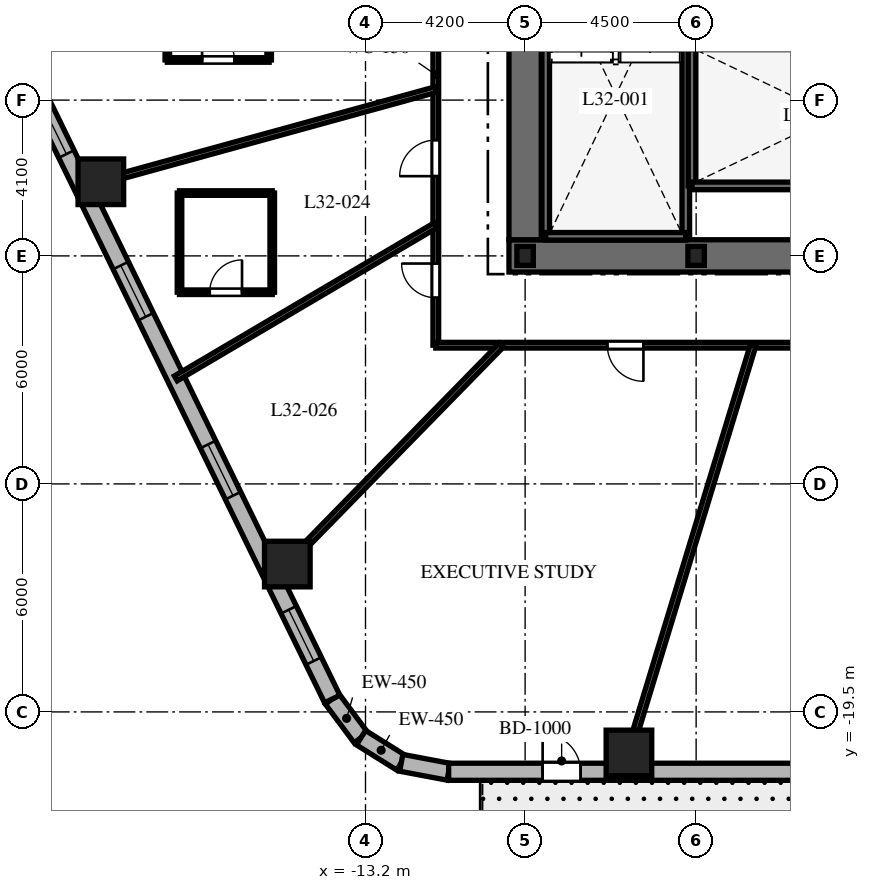
"""IFC4 building model, lengths in metres.
Left out: names, types, materials, properties, quantities, classifications, styles, units other than length and angle.
Written with IfcOpenShell. Run it as: python <this file> out.ifc"""

import sys

from ifc_helpers import new_model, si_unit, direction, frame, frame_2d, origin, origin_2d, place, context, subcontext, project, spatial, rectangle, i_section, extrude, element, fill, save


model = new_model("IFC4")
c1 = context("Model", 3, precision=1e-05, world=origin(), true_north=direction((0.0, 1.0)))
c2 = subcontext(c1, "Body", "Model", "MODEL_VIEW")
j1 = project(units=[si_unit("LENGTHUNIT", "METRE"), si_unit("PLANEANGLEUNIT", "RADIAN")], contexts=[c1])
p1 = place(None, origin())
s1 = spatial("IfcSite", under=j1, at=p1, CompositionType="ELEMENT")
p2 = place(p1, origin())
s2 = spatial("IfcBuilding", under=s1, at=p2, CompositionType="ELEMENT")
p3 = place(p2, frame((0.0, 0.0, 132.1)))
s3 = spatial("IfcBuildingStorey", under=s2, at=p3, CompositionType="ELEMENT", Elevation=132.1)
p4 = place(p3, frame((-9.425, -7.5, 0.0), z_axis=(0.0, 0.0, 1.0), x_axis=(1.0, 0.0, 0.0)))
e1 = element("IfcWall", 1, at=p4, inside=s3, PredefinedType="SHEAR", context=c2, shape_type="SweptSolid", body=[
    extrude(rectangle(XDim=18.85, YDim=0.85, at=frame_2d((9.425, 0.0))), origin(), (0.0, 0.0, 1.0), 3.7),
])
p5 = place(p4, frame((9.475, 0.0, 0.0)))
e2 = element("IfcOpeningElement", 2, at=p5, cuts=e1, PredefinedType="OPENING", context=c2, shape_type="SweptSolid", body=[
    extrude(rectangle(XDim=1.0, YDim=2.15, at=frame_2d((0.5, 1.075))), frame((0.0, 0.435, 0.0), z_axis=(0.0, -1.0, 0.0), x_axis=(1.0, 0.0, 0.0)), (0.0, 0.0, 1.0), 0.87),
])
p6 = place(p3, frame((-9.0, -7.075, 0.0), z_axis=(0.0, 0.0, 1.0), x_axis=(0.0, 1.0, 0.0)))
e3 = element("IfcWall", 3, at=p6, inside=s3, PredefinedType="SHEAR", context=c2, shape_type="SweptSolid", body=[
    extrude(rectangle(XDim=14.15, YDim=0.85, at=frame_2d((7.075, 0.0))), origin(), (0.0, 0.0, 1.0), 3.7),
])
p7 = place(p6, frame((10.2, 0.0, 0.0)))
e4 = element("IfcOpeningElement", 4, at=p7, cuts=e3, PredefinedType="OPENING", context=c2, shape_type="SweptSolid", body=[
    extrude(rectangle(XDim=1.05, YDim=2.15, at=frame_2d((0.525, 1.075))), frame((0.0, 0.435, 0.0), z_axis=(0.0, -1.0, 0.0), x_axis=(1.0, 0.0, 0.0)), (0.0, 0.0, 1.0), 0.87),
])
for number, where, z_axis, x_axis in (
    (5, (-8.458, -6.985, 0.0), (0.0, 0.0, 1.0), (0.0, 1.0, 0.0)),
    (6, (-4.772, -6.985, 0.0), (0.0, 0.0, 1.0), (0.0, 1.0, 0.0)),
):
    element("IfcWall", number, at=place(p3, frame(where, z_axis=z_axis, x_axis=x_axis)), inside=s3, PredefinedType="SHEAR", context=c2, shape_type="SweptSolid", body=[
        extrude(rectangle(XDim=9.143, YDim=0.2, at=frame_2d((4.572, 0.0))), origin(), (0.0, 0.0, 1.0), 3.7),
    ])
for number, where, z_axis, x_axis in (
    (7, (-8.458, -6.985, 0.0), (0.0, 0.0, 1.0), (1.0, 0.0, 0.0)),
    (8, (-4.608, -5.658, 0.0), (0.0, 0.0, 1.0), (0.0, 1.0, 0.0)),
):
    element("IfcWall", number, at=place(p3, frame(where, z_axis=z_axis, x_axis=x_axis)), inside=s3, PredefinedType="SHEAR", context=c2, shape_type="SweptSolid", body=[
        extrude(rectangle(XDim=3.686, YDim=0.2, at=frame_2d((1.843, 0.0))), origin(), (0.0, 0.0, 1.0), 3.7),
    ])
p8 = place(p3, frame((-4.608, -5.658, 0.0), z_axis=(0.0, 0.0, 1.0), x_axis=(1.0, 0.0, 0.0)))
e9 = element("IfcWall", 9, at=p8, inside=s3, PredefinedType="SHEAR", context=c2, shape_type="SweptSolid", body=[
    extrude(rectangle(XDim=9.166, YDim=0.2, at=frame_2d((4.583, 0.0))), origin(), (0.0, 0.0, 1.0), 3.7),
])
p9 = place(p8, frame((7.45, 0.0, 0.0)))
e10 = element("IfcOpeningElement", 10, at=p9, cuts=e9, PredefinedType="OPENING", context=c2, shape_type="SweptSolid", body=[
    extrude(rectangle(XDim=1.0, YDim=2.15, at=frame_2d((0.5, 1.075))), frame((0.0, 0.11, 0.0), z_axis=(0.0, -1.0, 0.0), x_axis=(1.0, 0.0, 0.0)), (0.0, 0.0, 1.0), 0.22),
])
for number, where, z_axis, x_axis in (
    (11, (-9.0, -7.5, 0.0), (0.0, 0.0, 1.0), (1.0, 0.0, 0.0)),
    (12, (-4.5, -7.5, 0.0), (0.0, 0.0, 1.0), (1.0, 0.0, 0.0)),
):
    element("IfcColumn", number, at=place(p3, frame(where, z_axis=z_axis, x_axis=x_axis)), inside=s3, PredefinedType="COLUMN", context=c2, shape_type="SweptSolid", body=[
        extrude(i_section(OverallWidth=0.432, OverallDepth=0.498, WebThickness=0.056, FlangeThickness=0.089, at=origin_2d()), origin(), (0.0, 0.0, 1.0), 3.7),
    ])
for number, where, z_axis, x_axis in (
    (13, (-6.268, -20.58, 0.0), (0.0, 0.0, 1.0), (1.0, 0.0, 0.0)),
    (14, (-20.164, -5.549, 0.0), (0.0, 0.0, 1.0), (1.0, 0.0, 0.0)),
    (15, (-15.257, -15.609, 0.0), (0.0, 0.0, 1.0), (1.0, 0.0, 0.0)),
):
    element("IfcColumn", number, at=place(p3, frame(where, z_axis=z_axis, x_axis=x_axis)), inside=s3, PredefinedType="COLUMN", context=c2, shape_type="SweptSolid", body=[
        extrude(rectangle(XDim=1.2, YDim=1.2, at=origin_2d()), origin(), (0.0, 0.0, 1.0), 3.7),
    ])
p10 = place(p3, frame((-14.076, -19.161, 0.0), z_axis=(0.0, 0.0, 1.0), x_axis=(0.597226657159, -0.802072515412, 0.0)))
e16 = element("IfcWall", 16, at=p10, inside=s3, PredefinedType="SOLIDWALL", context=c2, shape_type="SweptSolid", body=[
    extrude(rectangle(XDim=1.269, YDim=0.45, at=frame_2d((0.635, 0.0))), origin(), (0.0, 0.0, 1.0), 3.4),
])
p11 = place(p3, frame((-13.318, -20.179, 0.0), z_axis=(0.0, 0.0, 1.0), x_axis=(0.848031272749, -0.529946186362, 0.0)))
e17 = element("IfcWall", 17, at=p11, inside=s3, PredefinedType="SOLIDWALL", context=c2, shape_type="SweptSolid", body=[
    extrude(rectangle(XDim=1.248, YDim=0.45, at=frame_2d((0.624, 0.0))), origin(), (0.0, 0.0, 1.0), 3.4),
])
p12 = place(p3, frame((-12.259, -20.84, 0.0), z_axis=(0.0, 0.0, 1.0), x_axis=(0.982730354425, -0.185043374624, 0.0)))
e18 = element("IfcWall", 18, at=p12, inside=s3, PredefinedType="SOLIDWALL", context=c2, shape_type="SweptSolid", body=[
    extrude(rectangle(XDim=1.269, YDim=0.45, at=frame_2d((0.635, 0.0))), origin(), (0.0, 0.0, 1.0), 3.4),
])
p13 = place(p3, frame((-11.012, -21.075, 0.0), z_axis=(0.0, 0.0, 1.0), x_axis=(1.0, 0.0, 0.0)))
e19 = element("IfcWall", 19, at=p13, inside=s3, PredefinedType="SOLIDWALL", context=c2, shape_type="SweptSolid", body=[
    extrude(rectangle(XDim=23.782, YDim=0.45, at=frame_2d((11.891, 0.0))), origin(), (0.0, 0.0, 1.0), 3.4),
])
p14 = place(p13, frame((2.473, 0.0, 0.0)))
e20 = element("IfcOpeningElement", 20, at=p14, cuts=e19, PredefinedType="OPENING", context=c2, shape_type="SweptSolid", body=[
    extrude(rectangle(XDim=1.0, YDim=2.15, at=frame_2d((0.5, 1.075))), frame((0.0, 0.235, 0.0), z_axis=(0.0, -1.0, 0.0), x_axis=(1.0, 0.0, 0.0)), (0.0, 0.0, 1.0), 0.47),
])
p15 = place(p13, frame((11.142, 0.0, 0.8)))
e21 = element("IfcOpeningElement", 21, at=p15, cuts=e19, PredefinedType="OPENING", context=c2, shape_type="SweptSolid", body=[
    extrude(rectangle(XDim=1.5, YDim=1.8, at=frame_2d((0.75, 0.9))), frame((0.0, 0.235, 0.0), z_axis=(0.0, -1.0, 0.0), x_axis=(1.0, 0.0, 0.0)), (0.0, 0.0, 1.0), 0.47),
])
p16 = place(p13, frame((20.741, 0.0, 0.8)))
e22 = element("IfcOpeningElement", 22, at=p16, cuts=e19, PredefinedType="OPENING", context=c2, shape_type="SweptSolid", body=[
    extrude(rectangle(XDim=1.5, YDim=1.8, at=frame_2d((0.75, 0.9))), frame((0.0, 0.235, 0.0), z_axis=(0.0, -1.0, 0.0), x_axis=(1.0, 0.0, 0.0)), (0.0, 0.0, 1.0), 0.47),
])
p17 = place(p3, frame((-22.238, -2.427, 0.0), z_axis=(0.0, 0.0, 1.0), x_axis=(0.438374803278, -0.898792262901, 0.0)))
e23 = element("IfcWall", 23, at=p17, inside=s3, PredefinedType="SOLIDWALL", context=c2, shape_type="SweptSolid", body=[
    extrude(rectangle(XDim=18.618, YDim=0.45, at=frame_2d((9.309, 0.0))), origin(), (0.0, 0.0, 1.0), 3.4),
])
p18 = place(p17, frame((1.163, 0.0, 0.8)))
e24 = element("IfcOpeningElement", 24, at=p18, cuts=e23, PredefinedType="OPENING", context=c2, shape_type="SweptSolid", body=[
    extrude(rectangle(XDim=1.5, YDim=1.8, at=frame_2d((0.75, 0.9))), frame((0.0, 0.235, 0.0), z_axis=(0.0, -1.0, 0.0), x_axis=(1.0, 0.0, 0.0)), (0.0, 0.0, 1.0), 0.47),
])
p19 = place(p17, frame((5.926, 0.0, 0.8)))
e25 = element("IfcOpeningElement", 25, at=p19, cuts=e23, PredefinedType="OPENING", context=c2, shape_type="SweptSolid", body=[
    extrude(rectangle(XDim=1.5, YDim=1.8, at=frame_2d((0.75, 0.9))), frame((0.0, 0.235, 0.0), z_axis=(0.0, -1.0, 0.0), x_axis=(1.0, 0.0, 0.0)), (0.0, 0.0, 1.0), 0.47),
])
p20 = place(p17, frame((11.165, 0.0, 0.8)))
e26 = element("IfcOpeningElement", 26, at=p20, cuts=e23, PredefinedType="OPENING", context=c2, shape_type="SweptSolid", body=[
    extrude(rectangle(XDim=1.5, YDim=1.8, at=frame_2d((0.75, 0.9))), frame((0.0, 0.235, 0.0), z_axis=(0.0, -1.0, 0.0), x_axis=(1.0, 0.0, 0.0)), (0.0, 0.0, 1.0), 0.47),
])
p21 = place(p17, frame((16.006, 0.0, 0.8)))
e27 = element("IfcOpeningElement", 27, at=p21, cuts=e23, PredefinedType="OPENING", context=c2, shape_type="SweptSolid", body=[
    extrude(rectangle(XDim=1.5, YDim=1.8, at=frame_2d((0.75, 0.9))), frame((0.0, 0.235, 0.0), z_axis=(0.0, -1.0, 0.0), x_axis=(1.0, 0.0, 0.0)), (0.0, 0.0, 1.0), 0.47),
])
p22 = place(p3, frame((-11.35, -9.85, 0.0), z_axis=(0.0, 0.0, 1.0), x_axis=(0.0, 1.0, 0.0)))
e28 = element("IfcWall", 28, at=p22, inside=s3, PredefinedType="PARTITIONING", context=c2, shape_type="SweptSolid", body=[
    extrude(rectangle(XDim=19.7, YDim=0.15, at=frame_2d((9.85, 0.0))), origin(), (0.0, 0.0, 1.0), 2.84),
])
p23 = place(p22, frame((16.711, 0.0, 0.0)))
e29 = element("IfcOpeningElement", 29, at=p23, cuts=e28, PredefinedType="OPENING", context=c2, shape_type="SweptSolid", body=[
    extrude(rectangle(XDim=0.95, YDim=2.03, at=frame_2d((0.475, 1.015))), frame((0.0, 0.085, 0.0), z_axis=(0.0, -1.0, 0.0), x_axis=(1.0, 0.0, 0.0)), (0.0, 0.0, 1.0), 0.17),
])
p24 = place(p22, frame((12.968, 0.0, 0.0)))
e30 = element("IfcOpeningElement", 30, at=p24, cuts=e28, PredefinedType="OPENING", context=c2, shape_type="SweptSolid", body=[
    extrude(rectangle(XDim=0.9, YDim=2.03, at=frame_2d((0.45, 1.015))), frame((0.0, 0.085, 0.0), z_axis=(0.0, -1.0, 0.0), x_axis=(1.0, 0.0, 0.0)), (0.0, 0.0, 1.0), 0.17),
])
p25 = place(p22, frame((8.836, 0.0, 0.0)))
e31 = element("IfcOpeningElement", 31, at=p25, cuts=e28, PredefinedType="OPENING", context=c2, shape_type="SweptSolid", body=[
    extrude(rectangle(XDim=0.95, YDim=2.03, at=frame_2d((0.475, 1.015))), frame((0.0, 0.085, 0.0), z_axis=(0.0, -1.0, 0.0), x_axis=(1.0, 0.0, 0.0)), (0.0, 0.0, 1.0), 0.17),
])
p26 = place(p22, frame((4.448, 0.0, 0.0)))
e32 = element("IfcOpeningElement", 32, at=p26, cuts=e28, PredefinedType="OPENING", context=c2, shape_type="SweptSolid", body=[
    extrude(rectangle(XDim=0.95, YDim=2.03, at=frame_2d((0.475, 1.015))), frame((0.0, 0.085, 0.0), z_axis=(0.0, -1.0, 0.0), x_axis=(1.0, 0.0, 0.0)), (0.0, 0.0, 1.0), 0.17),
])
p27 = place(p22, frame((1.249, 0.0, 0.0)))
e33 = element("IfcOpeningElement", 33, at=p27, cuts=e28, PredefinedType="OPENING", context=c2, shape_type="SweptSolid", body=[
    extrude(rectangle(XDim=0.9, YDim=2.03, at=frame_2d((0.45, 1.015))), frame((0.0, 0.085, 0.0), z_axis=(0.0, -1.0, 0.0), x_axis=(1.0, 0.0, 0.0)), (0.0, 0.0, 1.0), 0.17),
])
p28 = place(p3, frame((11.35, -9.85, 0.0), z_axis=(0.0, 0.0, 1.0), x_axis=(-1.0, 0.0, 0.0)))
e34 = element("IfcWall", 34, at=p28, inside=s3, PredefinedType="PARTITIONING", context=c2, shape_type="SweptSolid", body=[
    extrude(rectangle(XDim=22.7, YDim=0.15, at=frame_2d((11.35, 0.0))), origin(), (0.0, 0.0, 1.0), 2.84),
])
p29 = place(p28, frame((17.237, 0.0, 0.0)))
e35 = element("IfcOpeningElement", 35, at=p29, cuts=e34, PredefinedType="OPENING", context=c2, shape_type="SweptSolid", body=[
    extrude(rectangle(XDim=0.95, YDim=2.03, at=frame_2d((0.475, 1.015))), frame((0.0, 0.085, 0.0), z_axis=(0.0, -1.0, 0.0), x_axis=(1.0, 0.0, 0.0)), (0.0, 0.0, 1.0), 0.17),
])
p30 = place(p28, frame((10.45, 0.0, 0.0)))
e36 = element("IfcOpeningElement", 36, at=p30, cuts=e34, PredefinedType="OPENING", context=c2, shape_type="SweptSolid", body=[
    extrude(rectangle(XDim=0.95, YDim=2.03, at=frame_2d((0.475, 1.015))), frame((0.0, 0.085, 0.0), z_axis=(0.0, -1.0, 0.0), x_axis=(1.0, 0.0, 0.0)), (0.0, 0.0, 1.0), 0.17),
])
p31 = place(p28, frame((3.399, 0.0, 0.0)))
e37 = element("IfcOpeningElement", 37, at=p31, cuts=e34, PredefinedType="OPENING", context=c2, shape_type="SweptSolid", body=[
    extrude(rectangle(XDim=0.95, YDim=2.03, at=frame_2d((0.475, 1.015))), frame((0.0, 0.085, 0.0), z_axis=(0.0, -1.0, 0.0), x_axis=(1.0, 0.0, 0.0)), (0.0, 0.0, 1.0), 0.17),
])
p32 = place(p3, frame((-11.35, -3.123, 0.0), z_axis=(0.0, 0.0, 1.0), x_axis=(-0.964151983214, -0.265350623261, 0.0)))
e38 = element("IfcWall", 38, at=p32, inside=s3, PredefinedType="PARTITIONING", context=c2, shape_type="SweptSolid", body=[
    extrude(rectangle(XDim=9.645, YDim=0.15, at=frame_2d((4.823, 0.0))), origin(), (0.0, 0.0, 1.0), 2.54),
])
p33 = place(p3, frame((-11.35, -6.691, 0.0), z_axis=(0.0, 0.0, 1.0), x_axis=(-0.861446954497, -0.507847560383, 0.0)))
e39 = element("IfcWall", 39, at=p33, inside=s3, PredefinedType="PARTITIONING", context=c2, shape_type="SweptSolid", body=[
    extrude(rectangle(XDim=7.941, YDim=0.15, at=frame_2d((3.97, 0.0))), origin(), (0.0, 0.0, 1.0), 2.54),
])
p34 = place(p3, frame((-9.628, -9.85, 0.0), z_axis=(0.0, 0.0, 1.0), x_axis=(-0.698992824326, -0.715128681805, 0.0)))
e40 = element("IfcWall", 40, at=p34, inside=s3, PredefinedType="PARTITIONING", context=c2, shape_type="SweptSolid", body=[
    extrude(rectangle(XDim=8.579, YDim=0.15, at=frame_2d((4.29, 0.0))), origin(), (0.0, 0.0, 1.0), 2.54),
])
p35 = place(p3, frame((-3.0, -9.85, 0.0), z_axis=(0.0, 0.0, 1.0), x_axis=(-0.291352035382, -0.95661590593, 0.0)))
e41 = element("IfcWall", 41, at=p35, inside=s3, PredefinedType="PARTITIONING", context=c2, shape_type="SweptSolid", body=[
    extrude(rectangle(XDim=11.734, YDim=0.15, at=frame_2d((5.867, 0.0))), origin(), (0.0, 0.0, 1.0), 2.54),
])
p36 = place(p3, frame((-18.415, -2.344, 0.0), z_axis=(0.0, 0.0, 1.0), x_axis=(1.0, 0.0, 0.0)))
e42 = element("IfcWall", 42, at=p36, inside=s3, PredefinedType="PARTITIONING", context=c2, shape_type="SweptSolid", body=[
    extrude(rectangle(XDim=2.68, YDim=0.12, at=frame_2d((1.34, 0.0))), origin(), (0.0, 0.0, 1.0), 2.84),
])
p37 = place(p36, frame((0.915, 0.0, 0.0)))
e43 = element("IfcOpeningElement", 43, at=p37, cuts=e42, PredefinedType="OPENING", context=c2, shape_type="SweptSolid", body=[
    extrude(rectangle(XDim=0.85, YDim=2.03, at=frame_2d((0.425, 1.015))), frame((0.0, 0.07, 0.0), z_axis=(0.0, -1.0, 0.0), x_axis=(1.0, 0.0, 0.0)), (0.0, 0.0, 1.0), 0.14),
])
for number, where, z_axis, x_axis in (
    (44, (-15.735, -2.344, 0.0), (0.0, 0.0, 1.0), (0.0, 1.0, 0.0)),
    (45, (-18.415, 0.196, 0.0), (0.0, 0.0, 1.0), (0.0, -1.0, 0.0)),
):
    element("IfcWall", number, at=place(p3, frame(where, z_axis=z_axis, x_axis=x_axis)), inside=s3, PredefinedType="PARTITIONING", context=c2, shape_type="SweptSolid", body=[
        extrude(rectangle(XDim=2.54, YDim=0.12, at=frame_2d((1.27, 0.0))), origin(), (0.0, 0.0, 1.0), 3.4),
    ])
p38 = place(p3, frame((-18.094, -8.456, 0.0), z_axis=(0.0, 0.0, 1.0), x_axis=(1.0, 0.0, 0.0)))
e46 = element("IfcWall", 46, at=p38, inside=s3, PredefinedType="PARTITIONING", context=c2, shape_type="SweptSolid", body=[
    extrude(rectangle(XDim=2.44, YDim=0.12, at=frame_2d((1.22, 0.0))), origin(), (0.0, 0.0, 1.0), 3.4),
])
p39 = place(p38, frame((0.795, 0.0, 0.0)))
e47 = element("IfcOpeningElement", 47, at=p39, cuts=e46, PredefinedType="OPENING", context=c2, shape_type="SweptSolid", body=[
    extrude(rectangle(XDim=0.85, YDim=2.03, at=frame_2d((0.425, 1.015))), frame((0.0, 0.07, 0.0), z_axis=(0.0, -1.0, 0.0), x_axis=(1.0, 0.0, 0.0)), (0.0, 0.0, 1.0), 0.14),
])
p40 = place(p3, frame((-15.654, -8.456, 0.0), z_axis=(0.0, 0.0, 1.0), x_axis=(0.0, 1.0, 0.0)))
e48 = element("IfcWall", 48, at=p40, inside=s3, PredefinedType="PARTITIONING", context=c2, shape_type="SweptSolid", body=[
    extrude(rectangle(XDim=2.61, YDim=0.12, at=frame_2d((1.305, 0.0))), origin(), (0.0, 0.0, 1.0), 2.84),
])
p41 = place(p3, frame((-15.654, -5.846, 0.0), z_axis=(0.0, 0.0, 1.0), x_axis=(-1.0, 0.0, 0.0)))
e49 = element("IfcWall", 49, at=p41, inside=s3, PredefinedType="PARTITIONING", context=c2, shape_type="SweptSolid", body=[
    extrude(rectangle(XDim=2.44, YDim=0.12, at=frame_2d((1.22, 0.0))), origin(), (0.0, 0.0, 1.0), 2.84),
])
p42 = place(p3, frame((-18.094, -5.846, 0.0), z_axis=(0.0, 0.0, 1.0), x_axis=(0.0, -1.0, 0.0)))
e50 = element("IfcWall", 50, at=p42, inside=s3, PredefinedType="PARTITIONING", context=c2, shape_type="SweptSolid", body=[
    extrude(rectangle(XDim=2.61, YDim=0.12, at=frame_2d((1.305, 0.0))), origin(), (0.0, 0.0, 1.0), 2.84),
])
p43 = place(p14, origin())
e51 = element("IfcDoor", 51, at=p43, inside=s3, OperationType="SINGLE_SWING_LEFT", PredefinedType="DOOR", context=c2, shape_type="SweptSolid", body=[
    extrude(rectangle(XDim=1.0, YDim=2.15, at=frame_2d((0.5, 1.075))), frame((0.0, 0.025, 0.0), z_axis=(0.0, -1.0, 0.0), x_axis=(1.0, 0.0, 0.0)), (0.0, 0.0, 1.0), 0.05),
])
fill(e20, e51)
p44 = place(p18, origin())
e52 = element("IfcWindow", 52, at=p44, inside=s3, PartitioningType="SINGLE_PANEL", PredefinedType="WINDOW", context=c2, shape_type="SweptSolid", body=[
    extrude(rectangle(XDim=1.5, YDim=1.8, at=frame_2d((0.75, 0.9))), frame((0.0, 0.03, 0.0), z_axis=(0.0, -1.0, 0.0), x_axis=(1.0, 0.0, 0.0)), (0.0, 0.0, 1.0), 0.06),
])
fill(e24, e52)
p45 = place(p19, origin())
e53 = element("IfcWindow", 53, at=p45, inside=s3, PartitioningType="SINGLE_PANEL", PredefinedType="WINDOW", context=c2, shape_type="SweptSolid", body=[
    extrude(rectangle(XDim=1.5, YDim=1.8, at=frame_2d((0.75, 0.9))), frame((0.0, 0.03, 0.0), z_axis=(0.0, -1.0, 0.0), x_axis=(1.0, 0.0, 0.0)), (0.0, 0.0, 1.0), 0.06),
])
fill(e25, e53)
p46 = place(p20, origin())
e54 = element("IfcWindow", 54, at=p46, inside=s3, PartitioningType="SINGLE_PANEL", PredefinedType="WINDOW", context=c2, shape_type="SweptSolid", body=[
    extrude(rectangle(XDim=1.5, YDim=1.8, at=frame_2d((0.75, 0.9))), frame((0.0, 0.03, 0.0), z_axis=(0.0, -1.0, 0.0), x_axis=(1.0, 0.0, 0.0)), (0.0, 0.0, 1.0), 0.06),
])
fill(e26, e54)
p47 = place(p21, origin())
e55 = element("IfcWindow", 55, at=p47, inside=s3, PartitioningType="SINGLE_PANEL", PredefinedType="WINDOW", context=c2, shape_type="SweptSolid", body=[
    extrude(rectangle(XDim=1.5, YDim=1.8, at=frame_2d((0.75, 0.9))), frame((0.0, 0.03, 0.0), z_axis=(0.0, -1.0, 0.0), x_axis=(1.0, 0.0, 0.0)), (0.0, 0.0, 1.0), 0.06),
])
fill(e27, e55)
p48 = place(p37, origin())
e56 = element("IfcDoor", 56, at=p48, inside=s3, OperationType="SINGLE_SWING_LEFT", PredefinedType="DOOR", context=c2, shape_type="SweptSolid", body=[
    extrude(rectangle(XDim=0.85, YDim=2.03, at=frame_2d((0.425, 1.015))), frame((0.0, 0.025, 0.0), z_axis=(0.0, -1.0, 0.0), x_axis=(1.0, 0.0, 0.0)), (0.0, 0.0, 1.0), 0.05),
])
fill(e43, e56)
p49 = place(p26, origin())
e57 = element("IfcDoor", 57, at=p49, inside=s3, OperationType="SINGLE_SWING_LEFT", PredefinedType="DOOR", context=c2, shape_type="SweptSolid", body=[
    extrude(rectangle(XDim=0.95, YDim=2.03, at=frame_2d((0.475, 1.015))), frame((0.0, 0.025, 0.0), z_axis=(0.0, -1.0, 0.0), x_axis=(1.0, 0.0, 0.0)), (0.0, 0.0, 1.0), 0.05),
])
fill(e32, e57)
p50 = place(p39, origin())
e58 = element("IfcDoor", 58, at=p50, inside=s3, OperationType="SINGLE_SWING_RIGHT", PredefinedType="DOOR", context=c2, shape_type="SweptSolid", body=[
    extrude(rectangle(XDim=0.85, YDim=2.03, at=frame_2d((0.425, 1.015))), frame((0.0, 0.025, 0.0), z_axis=(0.0, -1.0, 0.0), x_axis=(1.0, 0.0, 0.0)), (0.0, 0.0, 1.0), 0.05),
])
fill(e47, e58)
p51 = place(p27, origin())
e59 = element("IfcDoor", 59, at=p51, inside=s3, OperationType="SINGLE_SWING_RIGHT", PredefinedType="DOOR", context=c2, shape_type="SweptSolid", body=[
    extrude(rectangle(XDim=0.9, YDim=2.03, at=frame_2d((0.45, 1.015))), frame((0.0, 0.025, 0.0), z_axis=(0.0, -1.0, 0.0), x_axis=(1.0, 0.0, 0.0)), (0.0, 0.0, 1.0), 0.05),
])
fill(e33, e59)
p52 = place(p29, origin())
e60 = element("IfcDoor", 60, at=p52, inside=s3, OperationType="SINGLE_SWING_LEFT", PredefinedType="DOOR", context=c2, shape_type="SweptSolid", body=[
    extrude(rectangle(XDim=0.95, YDim=2.03, at=frame_2d((0.475, 1.015))), frame((0.0, 0.025, 0.0), z_axis=(0.0, -1.0, 0.0), x_axis=(1.0, 0.0, 0.0)), (0.0, 0.0, 1.0), 0.05),
])
fill(e35, e60)
save(model, sys.argv[1])
